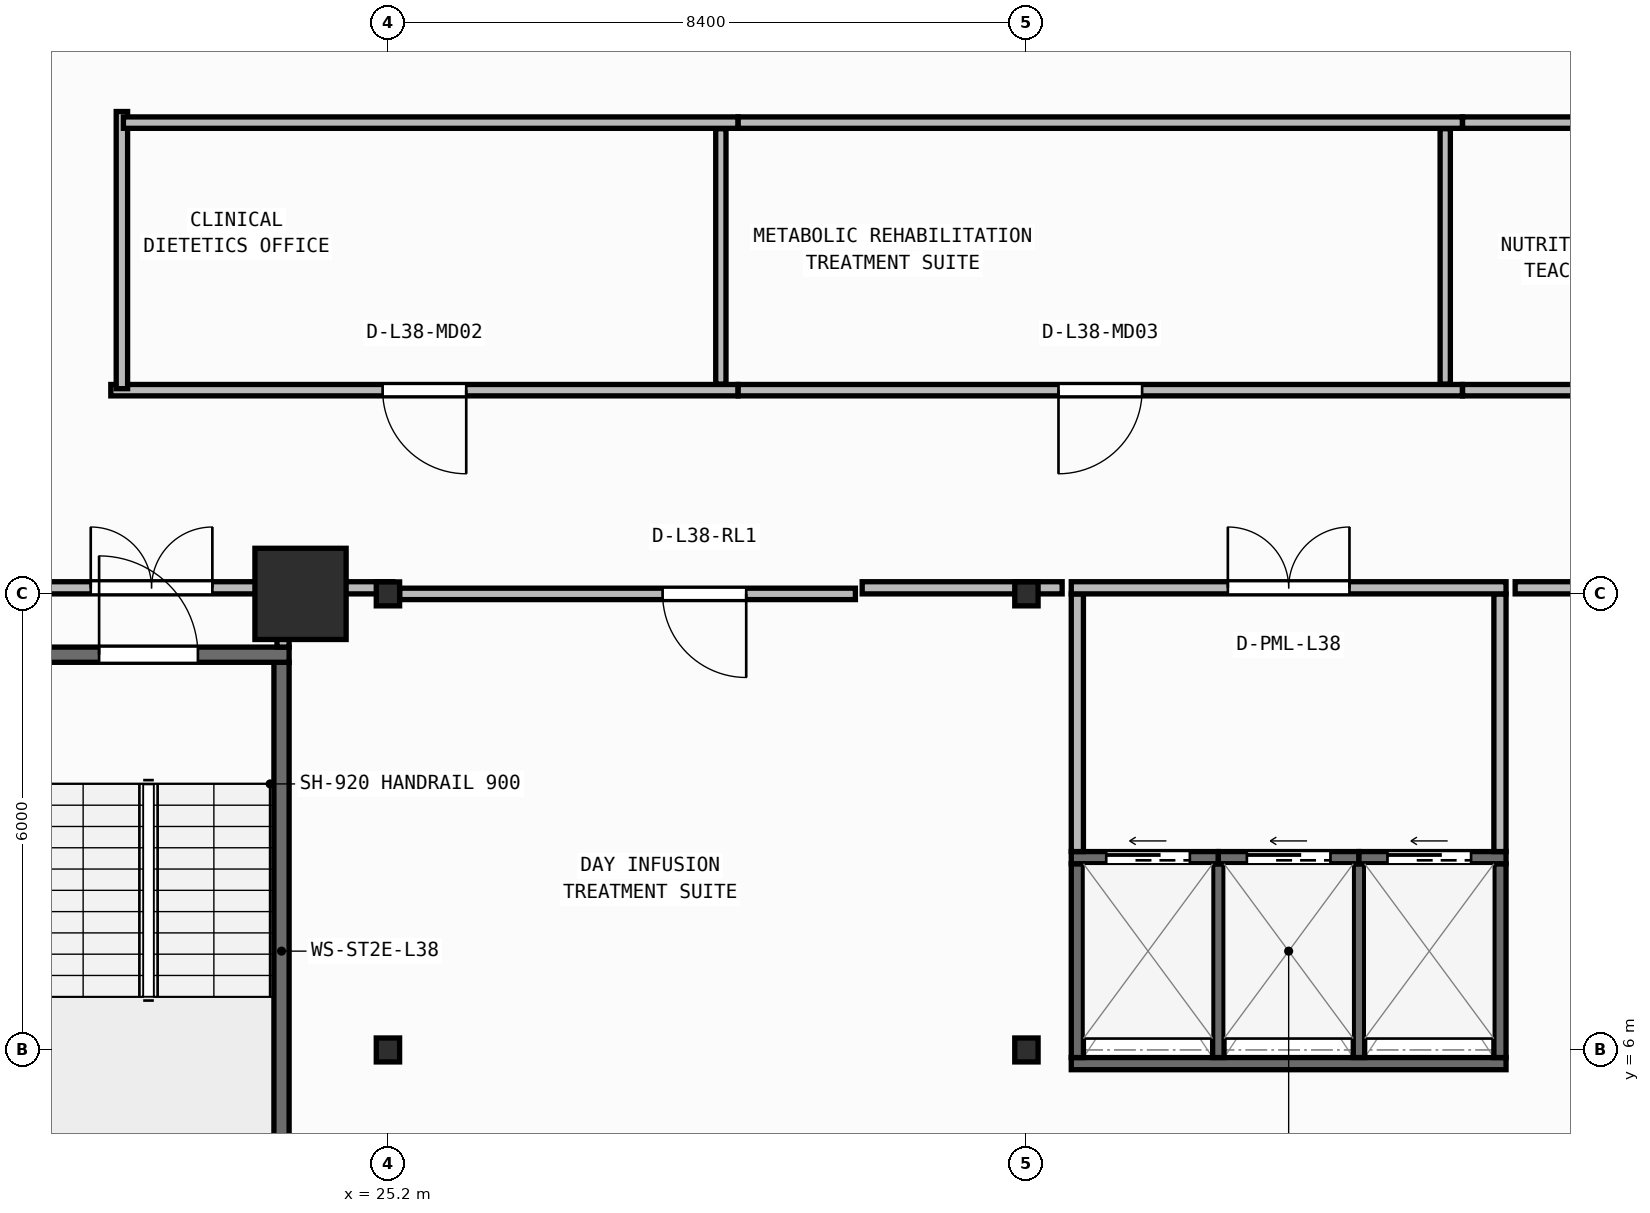
"""IFC4 building model, lengths in metres.
Left out: names, types, materials, properties, quantities, classifications, styles, units other than length and angle.
Written with IfcOpenShell. Run it as: python <this file> out.ifc"""

import sys

from ifc_helpers import new_model, si_unit, direction, frame, frame_2d, origin, origin_2d, place, context, subcontext, project, spatial, rectangle, i_section, extrude, element, fill, save


model = new_model("IFC4")
c1 = context("Model", 3, precision=1e-05, world=origin(), true_north=direction((0.0, 1.0)))
c2 = subcontext(c1, "Body", "Model", "MODEL_VIEW")
j1 = project(units=[si_unit("LENGTHUNIT", "METRE"), si_unit("PLANEANGLEUNIT", "RADIAN")], contexts=[c1])
p1 = place(None, origin())
s1 = spatial("IfcSite", under=j1, at=p1, CompositionType="ELEMENT")
p2 = place(p1, origin())
s2 = spatial("IfcBuilding", under=s1, at=p2, CompositionType="ELEMENT")
p3 = place(p2, frame((0.0, 0.0, 154.7)))
s3 = spatial("IfcBuildingStorey", under=s2, at=p3, CompositionType="ELEMENT", Elevation=154.7)
for number, where, z_axis, x_axis in (
    (1, (25.2, 6.0, 0.0), (0.0, 0.0, 1.0), (1.0, 0.0, 0.0)),
    (2, (33.6, 6.0, 0.0), (0.0, 0.0, 1.0), (1.0, 0.0, 0.0)),
):
    element("IfcColumn", number, at=place(p3, frame(where, z_axis=z_axis, x_axis=x_axis)), inside=s3, PredefinedType="COLUMN", context=c2, shape_type="SweptSolid", body=[
        extrude(i_section(OverallWidth=0.307, OverallDepth=0.315, WebThickness=0.012, FlangeThickness=0.019, FilletRadius=0.017, at=origin_2d()), origin(), (0.0, 0.0, 1.0), 3.95),
    ])
p4 = place(p3, frame((24.05, 12.0, 0.0), z_axis=(0.0, 0.0, 1.0), x_axis=(1.0, 0.0, 0.0)))
e3 = element("IfcColumn", 3, at=p4, inside=s3, PredefinedType="COLUMN", context=c2, shape_type="SweptSolid", body=[
    extrude(rectangle(XDim=1.2, YDim=1.2, at=origin_2d()), origin(), (0.0, 0.0, 1.0), 3.95),
])
for number, where, z_axis, x_axis in (
    (4, (25.2, 12.0, 0.0), (0.0, 0.0, 1.0), (1.0, 0.0, 0.0)),
    (5, (33.6, 12.0, 0.0), (0.0, 0.0, 1.0), (1.0, 0.0, 0.0)),
):
    element("IfcColumn", number, at=place(p3, frame(where, z_axis=z_axis, x_axis=x_axis)), inside=s3, PredefinedType="COLUMN", context=c2, shape_type="SweptSolid", body=[
        extrude(i_section(OverallWidth=0.307, OverallDepth=0.315, WebThickness=0.012, FlangeThickness=0.019, FilletRadius=0.017, at=origin_2d()), origin(), (0.0, 0.0, 1.0), 3.95),
    ])
p5 = place(p3, frame((23.8, 3.5, 0.0), z_axis=(0.0, 0.0, 1.0), x_axis=(0.0, 1.0, 0.0)))
e6 = element("IfcWall", 6, at=p5, inside=s3, PredefinedType="SHEAR", context=c2, shape_type="SweptSolid", body=[
    extrude(rectangle(XDim=7.6, YDim=0.2, at=frame_2d((3.8, 0.0))), origin(), (0.0, 0.0, 1.0), 3.71),
])
p6 = place(p3, frame((20.2, 11.2, 0.0), z_axis=(0.0, 0.0, 1.0), x_axis=(1.0, 0.0, 0.0)))
e7 = element("IfcWall", 7, at=p6, inside=s3, PredefinedType="SHEAR", context=c2, shape_type="SweptSolid", body=[
    extrude(rectangle(XDim=3.7, YDim=0.2, at=frame_2d((1.85, 0.0))), origin(), (0.0, 0.0, 1.0), 3.71),
])
p7 = place(p6, frame((1.2, 0.0, 0.0)))
e8 = element("IfcOpeningElement", 8, at=p7, cuts=e7, PredefinedType="OPENING", context=c2, shape_type="SweptSolid", body=[
    extrude(rectangle(XDim=1.3, YDim=2.15, at=frame_2d((0.65, 1.075))), frame((0.0, 0.11, 0.0), z_axis=(0.0, -1.0, 0.0), x_axis=(1.0, 0.0, 0.0)), (0.0, 0.0, 1.0), 0.22),
])
p8 = place(p3, frame((34.19, 5.82, 0.0), z_axis=(0.0, 0.0, 1.0), x_axis=(1.0, 0.0, 0.0)))
e9 = element("IfcWall", 9, at=p8, inside=s3, PredefinedType="SHEAR", context=c2, shape_type="SweptSolid", body=[
    extrude(rectangle(XDim=5.72, YDim=0.16, at=frame_2d((2.86, 0.0))), origin(), (0.0, 0.0, 1.0), 3.71),
])
for number, where, z_axis, x_axis in (
    (10, (34.27, 5.9, 0.0), (0.0, 0.0, 1.0), (0.0, 1.0, 0.0)),
    (11, (39.83, 5.9, 0.0), (0.0, 0.0, 1.0), (0.0, 1.0, 0.0)),
):
    element("IfcWall", number, at=place(p3, frame(where, z_axis=z_axis, x_axis=x_axis)), inside=s3, PredefinedType="SHEAR", context=c2, shape_type="SweptSolid", body=[
        extrude(rectangle(XDim=2.55, YDim=0.16, at=frame_2d((1.275, 0.0))), origin(), (0.0, 0.0, 1.0), 3.71),
    ])
for number, where, z_axis, x_axis in (
    (12, (36.125, 5.9, 0.0), (0.0, 0.0, 1.0), (0.0, 1.0, 0.0)),
    (13, (37.975, 5.9, 0.0), (0.0, 0.0, 1.0), (0.0, 1.0, 0.0)),
):
    element("IfcWall", number, at=place(p3, frame(where, z_axis=z_axis, x_axis=x_axis)), inside=s3, PredefinedType="SHEAR", context=c2, shape_type="SweptSolid", body=[
        extrude(rectangle(XDim=2.55, YDim=0.15, at=frame_2d((1.275, 0.0))), origin(), (0.0, 0.0, 1.0), 3.71),
    ])
p9 = place(p3, frame((34.19, 8.53, 0.0), z_axis=(0.0, 0.0, 1.0), x_axis=(1.0, 0.0, 0.0)))
e14 = element("IfcWall", 14, at=p9, inside=s3, PredefinedType="SHEAR", context=c2, shape_type="SweptSolid", body=[
    extrude(rectangle(XDim=1.935, YDim=0.16, at=frame_2d((0.968, 0.0))), origin(), (0.0, 0.0, 1.0), 3.71),
])
p10 = place(p9, frame((0.46, 0.0, 0.0)))
e15 = element("IfcOpeningElement", 15, at=p10, cuts=e14, PredefinedType="OPENING", context=c2, shape_type="SweptSolid", body=[
    extrude(rectangle(XDim=1.1, YDim=2.15, at=frame_2d((0.55, 1.075))), frame((0.0, 0.09, 0.0), z_axis=(0.0, -1.0, 0.0), x_axis=(1.0, 0.0, 0.0)), (0.0, 0.0, 1.0), 0.18),
])
p11 = place(p3, frame((36.125, 8.53, 0.0), z_axis=(0.0, 0.0, 1.0), x_axis=(1.0, 0.0, 0.0)))
e16 = element("IfcWall", 16, at=p11, inside=s3, PredefinedType="SHEAR", context=c2, shape_type="SweptSolid", body=[
    extrude(rectangle(XDim=1.85, YDim=0.16, at=frame_2d((0.925, 0.0))), origin(), (0.0, 0.0, 1.0), 3.71),
])
p12 = place(p11, frame((0.375, 0.0, 0.0)))
e17 = element("IfcOpeningElement", 17, at=p12, cuts=e16, PredefinedType="OPENING", context=c2, shape_type="SweptSolid", body=[
    extrude(rectangle(XDim=1.1, YDim=2.15, at=frame_2d((0.55, 1.075))), frame((0.0, 0.09, 0.0), z_axis=(0.0, -1.0, 0.0), x_axis=(1.0, 0.0, 0.0)), (0.0, 0.0, 1.0), 0.18),
])
p13 = place(p3, frame((37.975, 8.53, 0.0), z_axis=(0.0, 0.0, 1.0), x_axis=(1.0, 0.0, 0.0)))
e18 = element("IfcWall", 18, at=p13, inside=s3, PredefinedType="SHEAR", context=c2, shape_type="SweptSolid", body=[
    extrude(rectangle(XDim=1.935, YDim=0.16, at=frame_2d((0.967, 0.0))), origin(), (0.0, 0.0, 1.0), 3.71),
])
p14 = place(p13, frame((0.375, 0.0, 0.0)))
e19 = element("IfcOpeningElement", 19, at=p14, cuts=e18, PredefinedType="OPENING", context=c2, shape_type="SweptSolid", body=[
    extrude(rectangle(XDim=1.1, YDim=2.15, at=frame_2d((0.55, 1.075))), frame((0.0, 0.09, 0.0), z_axis=(0.0, -1.0, 0.0), x_axis=(1.0, 0.0, 0.0)), (0.0, 0.0, 1.0), 0.18),
])
p15 = place(p3, frame((20.28, 12.08, 0.0), z_axis=(0.0, 0.0, 1.0), x_axis=(1.0, 0.0, 0.0)))
e20 = element("IfcWall", 20, at=p15, inside=s3, PredefinedType="PARTITIONING", context=c2, shape_type="SweptSolid", body=[
    extrude(rectangle(XDim=3.62, YDim=0.16, at=frame_2d((1.81, 0.0))), origin(), (0.0, 0.0, 1.0), 3.083),
])
p16 = place(p15, frame((1.01, 0.0, 0.0)))
e21 = element("IfcOpeningElement", 21, at=p16, cuts=e20, PredefinedType="OPENING", context=c2, shape_type="SweptSolid", body=[
    extrude(rectangle(XDim=1.6, YDim=2.05, at=frame_2d((0.8, 1.025))), frame((0.0, 0.09, 0.0), z_axis=(0.0, -1.0, 0.0), x_axis=(1.0, 0.0, 0.0)), (0.0, 0.0, 1.0), 0.18),
])
p17 = place(p3, frame((23.82, 11.3, 0.0), z_axis=(0.0, 0.0, 1.0), x_axis=(0.0, 1.0, 0.0)))
e22 = element("IfcWall", 22, at=p17, inside=s3, PredefinedType="PARTITIONING", context=c2, shape_type="SweptSolid", body=[
    extrude(rectangle(XDim=0.7, YDim=0.16, at=frame_2d((0.35, 0.0))), origin(), (0.0, 0.0, 1.0), 3.71),
])
for number, where, z_axis, x_axis in (
    (23, (34.27, 8.61, 0.0), (0.0, 0.0, 1.0), (0.0, 1.0, 0.0)),
    (24, (39.83, 8.61, 0.0), (0.0, 0.0, 1.0), (0.0, 1.0, 0.0)),
):
    element("IfcWall", number, at=place(p3, frame(where, z_axis=z_axis, x_axis=x_axis)), inside=s3, PredefinedType="PARTITIONING", context=c2, shape_type="SweptSolid", body=[
        extrude(rectangle(XDim=3.39, YDim=0.16, at=frame_2d((1.695, 0.0))), origin(), (0.0, 0.0, 1.0), 3.71),
    ])
p18 = place(p3, frame((34.19, 12.08, 0.0), z_axis=(0.0, 0.0, 1.0), x_axis=(1.0, 0.0, 0.0)))
e25 = element("IfcWall", 25, at=p18, inside=s3, PredefinedType="PARTITIONING", context=c2, shape_type="SweptSolid", body=[
    extrude(rectangle(XDim=5.72, YDim=0.16, at=frame_2d((2.86, 0.0))), origin(), (0.0, 0.0, 1.0), 3.083),
])
p19 = place(p18, frame((2.06, 0.0, 0.0)))
e26 = element("IfcOpeningElement", 26, at=p19, cuts=e25, PredefinedType="OPENING", context=c2, shape_type="SweptSolid", body=[
    extrude(rectangle(XDim=1.6, YDim=2.05, at=frame_2d((0.8, 1.025))), frame((0.0, 0.09, 0.0), z_axis=(0.0, -1.0, 0.0), x_axis=(1.0, 0.0, 0.0)), (0.0, 0.0, 1.0), 0.18),
])
p20 = place(p3, frame((31.35, 12.0, 0.0), z_axis=(0.0, 0.0, 1.0), x_axis=(-1.0, 0.0, 0.0)))
e27 = element("IfcWall", 27, at=p20, inside=s3, PredefinedType="PARTITIONING", context=c2, shape_type="SweptSolid", body=[
    extrude(rectangle(XDim=5.997, YDim=0.15, at=frame_2d((2.998, 0.0))), origin(), (0.0, 0.0, 1.0), 3.083),
])
p21 = place(p20, frame((1.437, 0.0, 0.0)))
e28 = element("IfcOpeningElement", 28, at=p21, cuts=e27, PredefinedType="OPENING", context=c2, shape_type="SweptSolid", body=[
    extrude(rectangle(XDim=1.1, YDim=2.1, at=frame_2d((0.55, 1.05))), frame((0.0, 0.085, 0.0), z_axis=(0.0, -1.0, 0.0), x_axis=(1.0, 0.0, 0.0)), (0.0, 0.0, 1.0), 0.17),
])
p22 = place(p3, frame((29.806, 14.68, 0.0), z_axis=(0.0, 0.0, 1.0), x_axis=(-1.0, 0.0, 0.0)))
e29 = element("IfcWall", 29, at=p22, inside=s3, PredefinedType="PARTITIONING", context=c2, shape_type="SweptSolid", body=[
    extrude(rectangle(XDim=8.252, YDim=0.15, at=frame_2d((4.126, 0.0))), origin(), (0.0, 0.0, 1.0), 3.71),
])
p23 = place(p22, frame((3.576, 0.0, 0.0)))
e30 = element("IfcOpeningElement", 30, at=p23, cuts=e29, PredefinedType="OPENING", context=c2, shape_type="SweptSolid", body=[
    extrude(rectangle(XDim=1.1, YDim=2.1, at=frame_2d((0.55, 1.05))), frame((0.0, 0.085, 0.0), z_axis=(0.0, -1.0, 0.0), x_axis=(1.0, 0.0, 0.0)), (0.0, 0.0, 1.0), 0.17),
])
p24 = place(p3, frame((39.336, 14.68, 0.0), z_axis=(0.0, 0.0, 1.0), x_axis=(-1.0, 0.0, 0.0)))
e31 = element("IfcWall", 31, at=p24, inside=s3, PredefinedType="PARTITIONING", context=c2, shape_type="SweptSolid", body=[
    extrude(rectangle(XDim=9.528, YDim=0.15, at=frame_2d((4.764, 0.0))), origin(), (0.0, 0.0, 1.0), 3.71),
])
p25 = place(p24, frame((4.214, 0.0, 0.0)))
e32 = element("IfcOpeningElement", 32, at=p25, cuts=e31, PredefinedType="OPENING", context=c2, shape_type="SweptSolid", body=[
    extrude(rectangle(XDim=1.1, YDim=2.1, at=frame_2d((0.55, 1.05))), frame((0.0, 0.085, 0.0), z_axis=(0.0, -1.0, 0.0), x_axis=(1.0, 0.0, 0.0)), (0.0, 0.0, 1.0), 0.17),
])
p26 = place(p3, frame((51.586, 14.68, 0.0), z_axis=(0.0, 0.0, 1.0), x_axis=(-1.0, 0.0, 0.0)))
e33 = element("IfcWall", 33, at=p26, inside=s3, PredefinedType="PARTITIONING", context=c2, shape_type="SweptSolid", body=[
    extrude(rectangle(XDim=12.248, YDim=0.15, at=frame_2d((6.124, 0.0))), origin(), (0.0, 0.0, 1.0), 3.71),
])
p27 = place(p26, frame((5.574, 0.0, 0.0)))
e34 = element("IfcOpeningElement", 34, at=p27, cuts=e33, PredefinedType="OPENING", context=c2, shape_type="SweptSolid", body=[
    extrude(rectangle(XDim=1.1, YDim=2.1, at=frame_2d((0.55, 1.05))), frame((0.0, 0.085, 0.0), z_axis=(0.0, -1.0, 0.0), x_axis=(1.0, 0.0, 0.0)), (0.0, 0.0, 1.0), 0.17),
])
p28 = place(p3, frame((21.7, 14.7, 0.0), z_axis=(0.0, 0.0, 1.0), x_axis=(0.0, 1.0, 0.0)))
e35 = element("IfcWall", 35, at=p28, inside=s3, PredefinedType="PARTITIONING", context=c2, shape_type="SweptSolid", body=[
    extrude(rectangle(XDim=3.646, YDim=0.15, at=frame_2d((1.823, 0.0))), origin(), (0.0, 0.0, 1.0), 3.71),
])
p29 = place(p3, frame((21.72, 18.2, 0.0), z_axis=(0.0, 0.0, 1.0), x_axis=(1.0, 0.0, 0.0)))
e36 = element("IfcWall", 36, at=p29, inside=s3, PredefinedType="PARTITIONING", context=c2, shape_type="SweptSolid", body=[
    extrude(rectangle(XDim=8.086, YDim=0.15, at=frame_2d((4.043, 0.0))), origin(), (0.0, 0.0, 1.0), 3.71),
])
p30 = place(p3, frame((29.808, 18.2, 0.0), z_axis=(0.0, 0.0, 1.0), x_axis=(1.0, 0.0, 0.0)))
e37 = element("IfcWall", 37, at=p30, inside=s3, PredefinedType="PARTITIONING", context=c2, shape_type="SweptSolid", body=[
    extrude(rectangle(XDim=9.528, YDim=0.15, at=frame_2d((4.764, 0.0))), origin(), (0.0, 0.0, 1.0), 3.71),
])
p31 = place(p3, frame((39.338, 18.2, 0.0), z_axis=(0.0, 0.0, 1.0), x_axis=(1.0, 0.0, 0.0)))
e38 = element("IfcWall", 38, at=p31, inside=s3, PredefinedType="PARTITIONING", context=c2, shape_type="SweptSolid", body=[
    extrude(rectangle(XDim=12.248, YDim=0.15, at=frame_2d((6.124, 0.0))), origin(), (0.0, 0.0, 1.0), 3.71),
])
for number, where, z_axis, x_axis in (
    (39, (29.58, 14.76, 0.0), (0.0, 0.0, 1.0), (0.0, 1.0, 0.0)),
    (40, (39.11, 14.76, 0.0), (0.0, 0.0, 1.0), (0.0, 1.0, 0.0)),
):
    element("IfcWall", number, at=place(p3, frame(where, z_axis=z_axis, x_axis=x_axis)), inside=s3, PredefinedType="PARTITIONING", context=c2, shape_type="SweptSolid", body=[
        extrude(rectangle(XDim=3.36, YDim=0.135, at=frame_2d((1.68, 0.0))), origin(), (0.0, 0.0, 1.0), 3.71),
    ])
p32 = place(p3, frame((24.02, 12.08, 0.0), z_axis=(0.0, 0.0, 1.0), x_axis=(1.0, 0.0, 0.0)))
e41 = element("IfcWall", 41, at=p32, inside=s3, PredefinedType="PARTITIONING", context=c2, shape_type="SweptSolid", body=[
    extrude(rectangle(XDim=1.244, YDim=0.16, at=frame_2d((0.622, 0.0))), origin(), (0.0, 0.0, 1.0), 3.083),
])
p33 = place(p3, frame((31.439, 12.08, 0.0), z_axis=(0.0, 0.0, 1.0), x_axis=(1.0, 0.0, 0.0)))
e42 = element("IfcWall", 42, at=p33, inside=s3, PredefinedType="PARTITIONING", context=c2, shape_type="SweptSolid", body=[
    extrude(rectangle(XDim=2.631, YDim=0.16, at=frame_2d((1.315, 0.0))), origin(), (0.0, 0.0, 1.0), 3.083),
])
p34 = place(p3, frame((40.03, 12.08, 0.0), z_axis=(0.0, 0.0, 1.0), x_axis=(1.0, 0.0, 0.0)))
e43 = element("IfcWall", 43, at=p34, inside=s3, PredefinedType="PARTITIONING", context=c2, shape_type="SweptSolid", body=[
    extrude(rectangle(XDim=2.781, YDim=0.16, at=frame_2d((1.39, 0.0))), origin(), (0.0, 0.0, 1.0), 3.083),
])
p35 = place(p7, origin())
e44 = element("IfcDoor", 44, at=p35, inside=s3, OperationType="SINGLE_SWING_LEFT", PredefinedType="DOOR", context=c2, shape_type="SweptSolid", body=[
    extrude(rectangle(XDim=1.3, YDim=2.15, at=frame_2d((0.65, 1.075))), frame((0.0, 0.025, 0.0), z_axis=(0.0, -1.0, 0.0), x_axis=(1.0, 0.0, 0.0)), (0.0, 0.0, 1.0), 0.05),
])
fill(e8, e44)
p36 = place(p10, origin())
e45 = element("IfcDoor", 45, at=p36, inside=s3, OperationType="SLIDING_TO_LEFT", PredefinedType="DOOR", context=c2, shape_type="SweptSolid", body=[
    extrude(rectangle(XDim=1.1, YDim=2.15, at=frame_2d((0.55, 1.075))), frame((0.0, 0.025, 0.0), z_axis=(0.0, -1.0, 0.0), x_axis=(1.0, 0.0, 0.0)), (0.0, 0.0, 1.0), 0.05),
])
fill(e15, e45)
p37 = place(p12, origin())
e46 = element("IfcDoor", 46, at=p37, inside=s3, OperationType="SLIDING_TO_LEFT", PredefinedType="DOOR", context=c2, shape_type="SweptSolid", body=[
    extrude(rectangle(XDim=1.1, YDim=2.15, at=frame_2d((0.55, 1.075))), frame((0.0, 0.025, 0.0), z_axis=(0.0, -1.0, 0.0), x_axis=(1.0, 0.0, 0.0)), (0.0, 0.0, 1.0), 0.05),
])
fill(e17, e46)
p38 = place(p14, origin())
e47 = element("IfcDoor", 47, at=p38, inside=s3, OperationType="SLIDING_TO_LEFT", PredefinedType="DOOR", context=c2, shape_type="SweptSolid", body=[
    extrude(rectangle(XDim=1.1, YDim=2.15, at=frame_2d((0.55, 1.075))), frame((0.0, 0.025, 0.0), z_axis=(0.0, -1.0, 0.0), x_axis=(1.0, 0.0, 0.0)), (0.0, 0.0, 1.0), 0.05),
])
fill(e19, e47)
p39 = place(p16, origin())
e48 = element("IfcDoor", 48, at=p39, inside=s3, OperationType="DOUBLE_DOOR_SINGLE_SWING", PredefinedType="DOOR", context=c2, shape_type="SweptSolid", body=[
    extrude(rectangle(XDim=1.6, YDim=2.05, at=frame_2d((0.8, 1.025))), frame((0.0, 0.025, 0.0), z_axis=(0.0, -1.0, 0.0), x_axis=(1.0, 0.0, 0.0)), (0.0, 0.0, 1.0), 0.05),
])
fill(e21, e48)
p40 = place(p19, origin())
e49 = element("IfcDoor", 49, at=p40, inside=s3, OperationType="DOUBLE_DOOR_SINGLE_SWING", PredefinedType="DOOR", context=c2, shape_type="SweptSolid", body=[
    extrude(rectangle(XDim=1.6, YDim=2.05, at=frame_2d((0.8, 1.025))), frame((0.0, 0.025, 0.0), z_axis=(0.0, -1.0, 0.0), x_axis=(1.0, 0.0, 0.0)), (0.0, 0.0, 1.0), 0.05),
])
fill(e26, e49)
p41 = place(p21, origin())
e50 = element("IfcDoor", 50, at=p41, inside=s3, OperationType="SINGLE_SWING_LEFT", PredefinedType="DOOR", context=c2, shape_type="SweptSolid", body=[
    extrude(rectangle(XDim=1.1, YDim=2.1, at=frame_2d((0.55, 1.05))), frame((0.0, 0.025, 0.0), z_axis=(0.0, -1.0, 0.0), x_axis=(1.0, 0.0, 0.0)), (0.0, 0.0, 1.0), 0.05),
])
fill(e28, e50)
p42 = place(p23, origin())
e51 = element("IfcDoor", 51, at=p42, inside=s3, OperationType="SINGLE_SWING_LEFT", PredefinedType="DOOR", context=c2, shape_type="SweptSolid", body=[
    extrude(rectangle(XDim=1.1, YDim=2.1, at=frame_2d((0.55, 1.05))), frame((0.0, 0.025, 0.0), z_axis=(0.0, -1.0, 0.0), x_axis=(1.0, 0.0, 0.0)), (0.0, 0.0, 1.0), 0.05),
])
fill(e30, e51)
p43 = place(p25, origin())
e52 = element("IfcDoor", 52, at=p43, inside=s3, OperationType="SINGLE_SWING_RIGHT", PredefinedType="DOOR", context=c2, shape_type="SweptSolid", body=[
    extrude(rectangle(XDim=1.1, YDim=2.1, at=frame_2d((0.55, 1.05))), frame((0.0, 0.025, 0.0), z_axis=(0.0, -1.0, 0.0), x_axis=(1.0, 0.0, 0.0)), (0.0, 0.0, 1.0), 0.05),
])
fill(e32, e52)
save(model, sys.argv[1])
